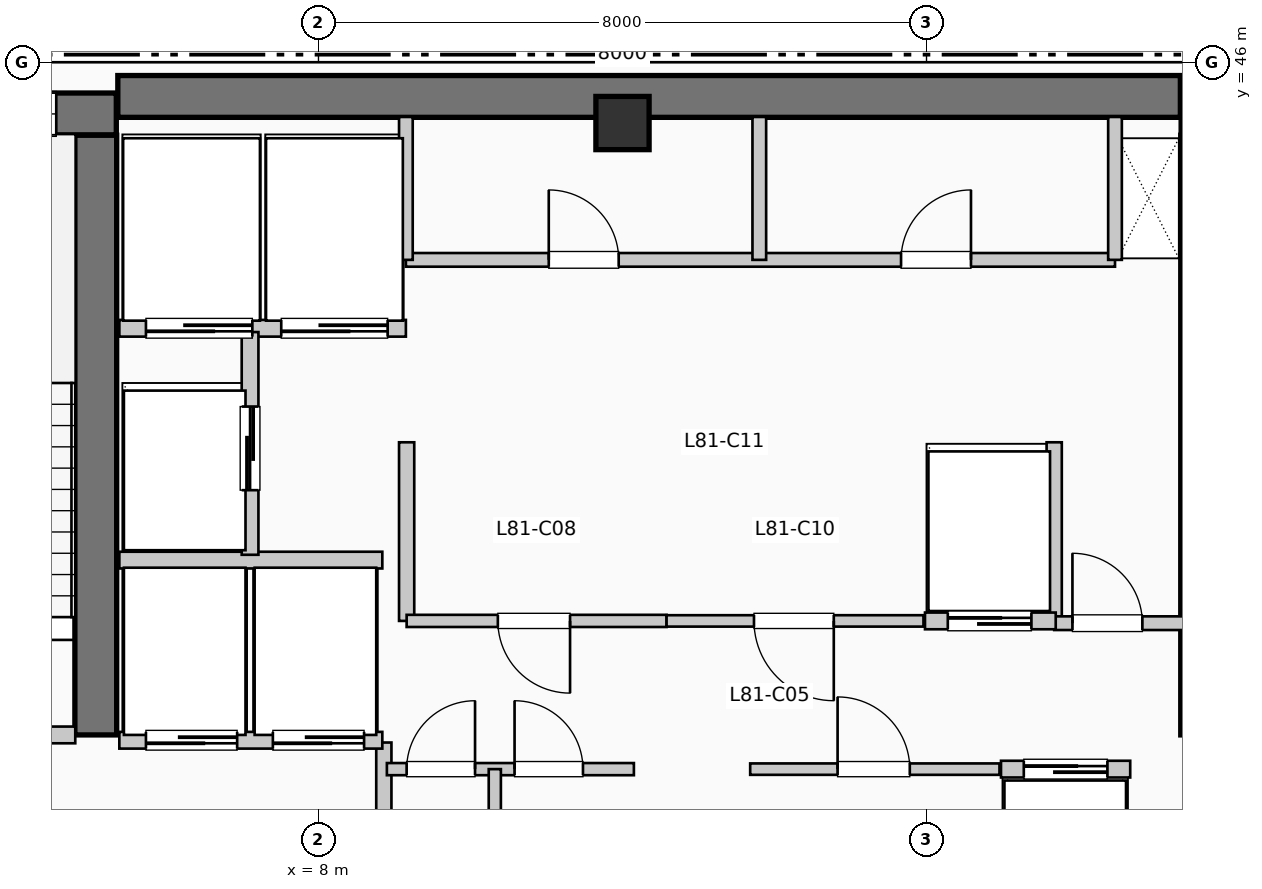
"""IFC4 building model, lengths in metres.
Left out: names, types, materials, properties, quantities, classifications, styles, units other than length and angle.
Written with IfcOpenShell. Run it as: python <this file> out.ifc"""

import sys

from ifc_helpers import new_model, si_unit, direction, frame, frame_2d, origin, origin_2d, place, context, subcontext, project, spatial, rectangle, extrude, element, fill, save


model = new_model("IFC4")
c1 = context("Model", 3, precision=1e-05, world=origin(), true_north=direction((0.0, 1.0)))
c2 = subcontext(c1, "Body", "Model", "MODEL_VIEW")
j1 = project(units=[si_unit("LENGTHUNIT", "METRE"), si_unit("PLANEANGLEUNIT", "RADIAN")], contexts=[c1])
p1 = place(None, origin())
s1 = spatial("IfcSite", under=j1, at=p1, CompositionType="ELEMENT")
p2 = place(p1, origin())
s2 = spatial("IfcBuilding", under=s1, at=p2, CompositionType="ELEMENT")
p3 = place(p2, frame((0.0, 0.0, 331.65)))
s3 = spatial("IfcBuildingStorey", under=s2, at=p3, CompositionType="ELEMENT", Elevation=331.65)
p4 = place(p3, frame((5.36, 45.55, 0.0), z_axis=(0.0, 0.0, 1.0), x_axis=(1.0, 0.0, 0.0)))
e1 = element("IfcWall", 1, at=p4, inside=s3, PredefinedType="SHEAR", context=c2, shape_type="SweptSolid", body=[
    extrude(rectangle(XDim=13.98, YDim=0.55, at=frame_2d((6.99, 0.0))), origin(), (0.0, 0.0, 1.0), 3.96),
])
p5 = place(p3, frame((5.07, 37.15, 0.0), z_axis=(0.0, 0.0, 1.0), x_axis=(0.0, 1.0, 0.0)))
e2 = element("IfcWall", 2, at=p5, inside=s3, PredefinedType="SHEAR", context=c2, shape_type="SweptSolid", body=[
    extrude(rectangle(XDim=7.89, YDim=0.55, at=frame_2d((3.945, 0.0))), origin(), (0.0, 0.0, 1.0), 3.96),
])
p6 = place(p3, frame((1.1, 45.32, 0.0), z_axis=(0.0, 0.0, 1.0), x_axis=(1.0, 0.0, 0.0)))
e3 = element("IfcWall", 3, at=p6, inside=s3, PredefinedType="SHEAR", context=c2, shape_type="SweptSolid", body=[
    extrude(rectangle(XDim=4.24, YDim=0.55, at=frame_2d((2.12, 0.0))), origin(), (0.0, 0.0, 1.0), 3.96),
])
p7 = place(p6, frame((2.05, 0.0, 1.05)))
e4 = element("IfcOpeningElement", 4, at=p7, cuts=e3, PredefinedType="OPENING", context=c2, shape_type="SweptSolid", body=[
    extrude(rectangle(XDim=1.4, YDim=1.8, at=frame_2d((0.7, 0.9))), frame((0.0, 0.285, 0.0), z_axis=(0.0, -1.0, 0.0), x_axis=(1.0, 0.0, 0.0)), (0.0, 0.0, 1.0), 0.57),
])
p8 = place(p3, frame((19.62, 37.15, 0.0), z_axis=(0.0, 0.0, 1.0), x_axis=(0.0, 1.0, 0.0)))
e5 = element("IfcWall", 5, at=p8, inside=s3, PredefinedType="SHEAR", context=c2, shape_type="SweptSolid", body=[
    extrude(rectangle(XDim=7.89, YDim=0.55, at=frame_2d((3.945, 0.0))), origin(), (0.0, 0.0, 1.0), 3.96),
])
p9 = place(p3, frame((19.35, 45.32, 0.0), z_axis=(0.0, 0.0, 1.0), x_axis=(1.0, 0.0, 0.0)))
e6 = element("IfcWall", 6, at=p9, inside=s3, PredefinedType="SHEAR", context=c2, shape_type="SweptSolid", body=[
    extrude(rectangle(XDim=3.69, YDim=0.55, at=frame_2d((1.845, 0.0))), origin(), (0.0, 0.0, 1.0), 3.96),
])
p10 = place(p9, frame((1.15, 0.0, 1.05)))
e7 = element("IfcOpeningElement", 7, at=p10, cuts=e6, PredefinedType="OPENING", context=c2, shape_type="SweptSolid", body=[
    extrude(rectangle(XDim=1.4, YDim=1.8, at=frame_2d((0.7, 0.9))), frame((0.0, 0.285, 0.0), z_axis=(0.0, -1.0, 0.0), x_axis=(1.0, 0.0, 0.0)), (0.0, 0.0, 1.0), 0.57),
])
p11 = place(p3, frame((12.0, 45.2, 0.0), z_axis=(0.0, 0.0, 1.0), x_axis=(1.0, 0.0, 0.0)))
e8 = element("IfcColumn", 8, at=p11, inside=s3, PredefinedType="COLUMN", context=c2, shape_type="SweptSolid", body=[
    extrude(rectangle(XDim=0.7, YDim=0.7, at=origin_2d()), origin(), (0.0, 0.0, 1.0), 3.96),
])
p12 = place(p3, frame((1.65, 37.15, 0.0), z_axis=(0.0, 0.0, 1.0), x_axis=(1.0, 0.0, 0.0)))
e9 = element("IfcWall", 9, at=p12, inside=s3, PredefinedType="PARTITIONING", context=c2, shape_type="SweptSolid", body=[
    extrude(rectangle(XDim=3.15, YDim=0.22, at=frame_2d((1.575, 0.0))), origin(), (0.0, 0.0, 1.0), 3.74),
])
p13 = place(p12, frame((2.05, 0.0, 0.0), z_axis=(0.0, 0.0, 1.0), x_axis=(-1.0, 0.0, 0.0)))
e10 = element("IfcOpeningElement", 10, at=p13, cuts=e9, PredefinedType="OPENING", context=c2, shape_type="SweptSolid", body=[
    extrude(rectangle(XDim=1.05, YDim=2.15, at=frame_2d((0.525, 1.075))), frame((0.0, 0.12, 0.0), z_axis=(0.0, -1.0, 0.0), x_axis=(1.0, 0.0, 0.0)), (0.0, 0.0, 1.0), 0.24),
])
p14 = place(p3, frame((8.86, 34.55, 0.0), z_axis=(0.0, 0.0, 1.0), x_axis=(0.0, 1.0, 0.0)))
e11 = element("IfcWall", 11, at=p14, inside=s3, PredefinedType="PARTITIONING", context=c2, shape_type="SweptSolid", body=[
    extrude(rectangle(XDim=2.5, YDim=0.2, at=frame_2d((1.25, 0.0))), origin(), (0.0, 0.0, 1.0), 3.74),
])
p15 = place(p3, frame((5.38, 37.08, 0.0), z_axis=(0.0, 0.0, 1.0), x_axis=(1.0, 0.0, 0.0)))
e12 = element("IfcWall", 12, at=p15, inside=s3, PredefinedType="PARTITIONING", context=c2, shape_type="SweptSolid", body=[
    extrude(rectangle(XDim=3.46, YDim=0.22, at=frame_2d((1.73, 0.0))), origin(), (0.0, 0.0, 1.0), 3.74),
])
p16 = place(p15, frame((1.55, 0.0, 0.0), z_axis=(0.0, 0.0, 1.0), x_axis=(-1.0, 0.0, 0.0)))
e13 = element("IfcOpeningElement", 13, at=p16, cuts=e12, PredefinedType="OPENING", context=c2, shape_type="SweptSolid", body=[
    extrude(rectangle(XDim=1.2, YDim=2.2, at=frame_2d((0.6, 1.1))), frame((0.0, 0.12, 0.0), z_axis=(0.0, -1.0, 0.0), x_axis=(1.0, 0.0, 0.0)), (0.0, 0.0, 1.0), 0.24),
])
p17 = place(p15, frame((3.22, 0.0, 0.0), z_axis=(0.0, 0.0, 1.0), x_axis=(-1.0, 0.0, 0.0)))
e14 = element("IfcOpeningElement", 14, at=p17, cuts=e12, PredefinedType="OPENING", context=c2, shape_type="SweptSolid", body=[
    extrude(rectangle(XDim=1.2, YDim=2.2, at=frame_2d((0.6, 1.1))), frame((0.0, 0.12, 0.0), z_axis=(0.0, -1.0, 0.0), x_axis=(1.0, 0.0, 0.0)), (0.0, 0.0, 1.0), 0.24),
])
p18 = place(p3, frame((5.38, 39.45, 0.0), z_axis=(0.0, 0.0, 1.0), x_axis=(1.0, 0.0, 0.0)))
e15 = element("IfcWall", 15, at=p18, inside=s3, PredefinedType="PARTITIONING", context=c2, shape_type="SweptSolid", body=[
    extrude(rectangle(XDim=3.46, YDim=0.22, at=frame_2d((1.73, 0.0))), origin(), (0.0, 0.0, 1.0), 3.74),
])
p19 = place(p3, frame((5.38, 42.5, 0.0), z_axis=(0.0, 0.0, 1.0), x_axis=(1.0, 0.0, 0.0)))
e16 = element("IfcWall", 16, at=p19, inside=s3, PredefinedType="PARTITIONING", context=c2, shape_type="SweptSolid", body=[
    extrude(rectangle(XDim=3.77, YDim=0.22, at=frame_2d((1.885, 0.0))), origin(), (0.0, 0.0, 1.0), 3.74),
])
p20 = place(p19, frame((1.75, 0.0, 0.0), z_axis=(0.0, 0.0, 1.0), x_axis=(-1.0, 0.0, 0.0)))
e17 = element("IfcOpeningElement", 17, at=p20, cuts=e16, PredefinedType="OPENING", context=c2, shape_type="SweptSolid", body=[
    extrude(rectangle(XDim=1.4, YDim=2.2, at=frame_2d((0.7, 1.1))), frame((0.0, 0.12, 0.0), z_axis=(0.0, -1.0, 0.0), x_axis=(1.0, 0.0, 0.0)), (0.0, 0.0, 1.0), 0.24),
])
p21 = place(p19, frame((3.53, 0.0, 0.0), z_axis=(0.0, 0.0, 1.0), x_axis=(-1.0, 0.0, 0.0)))
e18 = element("IfcOpeningElement", 18, at=p21, cuts=e16, PredefinedType="OPENING", context=c2, shape_type="SweptSolid", body=[
    extrude(rectangle(XDim=1.4, YDim=2.2, at=frame_2d((0.7, 1.1))), frame((0.0, 0.12, 0.0), z_axis=(0.0, -1.0, 0.0), x_axis=(1.0, 0.0, 0.0)), (0.0, 0.0, 1.0), 0.24),
])
p22 = place(p3, frame((7.1, 39.52, 0.0), z_axis=(0.0, 0.0, 1.0), x_axis=(0.0, 1.0, 0.0)))
e19 = element("IfcWall", 19, at=p22, inside=s3, PredefinedType="PARTITIONING", context=c2, shape_type="SweptSolid", body=[
    extrude(rectangle(XDim=2.93, YDim=0.22, at=frame_2d((1.465, 0.0))), origin(), (0.0, 0.0, 1.0), 3.74),
])
p23 = place(p22, frame((0.85, 0.0, 0.0)))
e20 = element("IfcOpeningElement", 20, at=p23, cuts=e19, PredefinedType="OPENING", context=c2, shape_type="SweptSolid", body=[
    extrude(rectangle(XDim=1.1, YDim=2.2, at=frame_2d((0.55, 1.1))), frame((0.0, 0.12, 0.0), z_axis=(0.0, -1.0, 0.0), x_axis=(1.0, 0.0, 0.0)), (0.0, 0.0, 1.0), 0.24),
])
for number, where, z_axis, x_axis in (
    (21, (9.16, 38.65, 0.0), (0.0, 0.0, 1.0), (0.0, 1.0, 0.0)),
    (22, (17.68, 38.65, 0.0), (0.0, 0.0, 1.0), (0.0, 1.0, 0.0)),
):
    element("IfcWall", number, at=place(p3, frame(where, z_axis=z_axis, x_axis=x_axis)), inside=s3, PredefinedType="PARTITIONING", context=c2, shape_type="SweptSolid", body=[
        extrude(rectangle(XDim=2.35, YDim=0.2, at=frame_2d((1.175, 0.0))), origin(), (0.0, 0.0, 1.0), 3.74),
    ])
p24 = place(p3, frame((17.68, 38.62, 0.0), z_axis=(0.0, 0.0, 1.0), x_axis=(1.0, 0.0, 0.0)))
e23 = element("IfcWall", 23, at=p24, inside=s3, PredefinedType="PARTITIONING", context=c2, shape_type="SweptSolid", body=[
    extrude(rectangle(XDim=1.84, YDim=0.18, at=frame_2d((0.92, 0.0))), origin(), (0.0, 0.0, 1.0), 3.74),
])
p25 = place(p24, frame((0.24, 0.0, 0.0)))
e24 = element("IfcOpeningElement", 24, at=p25, cuts=e23, PredefinedType="OPENING", context=c2, shape_type="SweptSolid", body=[
    extrude(rectangle(XDim=0.92, YDim=2.1, at=frame_2d((0.46, 1.05))), frame((0.0, 0.1, 0.0), z_axis=(0.0, -1.0, 0.0), x_axis=(1.0, 0.0, 0.0)), (0.0, 0.0, 1.0), 0.2),
])
p26 = place(p3, frame((8.9, 36.7, 0.0), z_axis=(0.0, 0.0, 1.0), x_axis=(1.0, 0.0, 0.0)))
e25 = element("IfcWall", 25, at=p26, inside=s3, PredefinedType="PARTITIONING", context=c2, shape_type="SweptSolid", body=[
    extrude(rectangle(XDim=3.25, YDim=0.16, at=frame_2d((1.625, 0.0))), origin(), (0.0, 0.0, 1.0), 3.74),
])
p27 = place(p26, frame((0.26, 0.0, 0.0)))
e26 = element("IfcOpeningElement", 26, at=p27, cuts=e25, PredefinedType="OPENING", context=c2, shape_type="SweptSolid", body=[
    extrude(rectangle(XDim=0.9, YDim=2.15, at=frame_2d((0.45, 1.075))), frame((0.0, 0.09, 0.0), z_axis=(0.0, -1.0, 0.0), x_axis=(1.0, 0.0, 0.0)), (0.0, 0.0, 1.0), 0.18),
])
p28 = place(p26, frame((1.68, 0.0, 0.0)))
e27 = element("IfcOpeningElement", 27, at=p28, cuts=e25, PredefinedType="OPENING", context=c2, shape_type="SweptSolid", body=[
    extrude(rectangle(XDim=0.9, YDim=2.15, at=frame_2d((0.45, 1.075))), frame((0.0, 0.09, 0.0), z_axis=(0.0, -1.0, 0.0), x_axis=(1.0, 0.0, 0.0)), (0.0, 0.0, 1.0), 0.18),
])
p29 = place(p3, frame((10.32, 34.55, 0.0), z_axis=(0.0, 0.0, 1.0), x_axis=(0.0, 1.0, 0.0)))
e28 = element("IfcWall", 28, at=p29, inside=s3, PredefinedType="PARTITIONING", context=c2, shape_type="SweptSolid", body=[
    extrude(rectangle(XDim=2.15, YDim=0.16, at=frame_2d((1.075, 0.0))), origin(), (0.0, 0.0, 1.0), 3.74),
])
p30 = place(p3, frame((9.16, 38.65, 0.0), z_axis=(0.0, 0.0, 1.0), x_axis=(1.0, 0.0, 0.0)))
e29 = element("IfcWall", 29, at=p30, inside=s3, PredefinedType="PARTITIONING", context=c2, shape_type="SweptSolid", body=[
    extrude(rectangle(XDim=3.42, YDim=0.16, at=frame_2d((1.71, 0.0))), origin(), (0.0, 0.0, 1.0), 3.74),
])
p31 = place(p30, frame((2.15, 0.0, 0.0), z_axis=(0.0, 0.0, 1.0), x_axis=(-1.0, 0.0, 0.0)))
e30 = element("IfcOpeningElement", 30, at=p31, cuts=e29, PredefinedType="OPENING", context=c2, shape_type="SweptSolid", body=[
    extrude(rectangle(XDim=0.95, YDim=2.15, at=frame_2d((0.475, 1.075))), frame((0.0, 0.09, 0.0), z_axis=(0.0, -1.0, 0.0), x_axis=(1.0, 0.0, 0.0)), (0.0, 0.0, 1.0), 0.18),
])
p32 = place(p3, frame((13.68, 36.7, 0.0), z_axis=(0.0, 0.0, 1.0), x_axis=(1.0, 0.0, 0.0)))
e31 = element("IfcWall", 31, at=p32, inside=s3, PredefinedType="PARTITIONING", context=c2, shape_type="SweptSolid", body=[
    extrude(rectangle(XDim=3.28, YDim=0.15, at=frame_2d((1.64, 0.0))), origin(), (0.0, 0.0, 1.0), 3.74),
])
p33 = place(p32, frame((1.15, 0.0, 0.0)))
e32 = element("IfcOpeningElement", 32, at=p33, cuts=e31, PredefinedType="OPENING", context=c2, shape_type="SweptSolid", body=[
    extrude(rectangle(XDim=0.95, YDim=2.15, at=frame_2d((0.475, 1.075))), frame((0.0, 0.085, 0.0), z_axis=(0.0, -1.0, 0.0), x_axis=(1.0, 0.0, 0.0)), (0.0, 0.0, 1.0), 0.17),
])
p34 = place(p3, frame((12.58, 38.65, 0.0), z_axis=(0.0, 0.0, 1.0), x_axis=(1.0, 0.0, 0.0)))
e33 = element("IfcWall", 33, at=p34, inside=s3, PredefinedType="PARTITIONING", context=c2, shape_type="SweptSolid", body=[
    extrude(rectangle(XDim=3.38, YDim=0.15, at=frame_2d((1.69, 0.0))), origin(), (0.0, 0.0, 1.0), 3.74),
])
p35 = place(p34, frame((2.2, 0.0, 0.0), z_axis=(0.0, 0.0, 1.0), x_axis=(-1.0, 0.0, 0.0)))
e34 = element("IfcOpeningElement", 34, at=p35, cuts=e33, PredefinedType="OPENING", context=c2, shape_type="SweptSolid", body=[
    extrude(rectangle(XDim=1.05, YDim=2.15, at=frame_2d((0.525, 1.075))), frame((0.0, 0.085, 0.0), z_axis=(0.0, -1.0, 0.0), x_axis=(1.0, 0.0, 0.0)), (0.0, 0.0, 1.0), 0.17),
])
p36 = place(p3, frame((16.98, 36.7, 0.0), z_axis=(0.0, 0.0, 1.0), x_axis=(1.0, 0.0, 0.0)))
e35 = element("IfcWall", 35, at=p36, inside=s3, PredefinedType="PARTITIONING", context=c2, shape_type="SweptSolid", body=[
    extrude(rectangle(XDim=1.7, YDim=0.22, at=frame_2d((0.85, 0.0))), origin(), (0.0, 0.0, 1.0), 3.74),
])
p37 = place(p36, frame((0.3, 0.0, 0.0)))
e36 = element("IfcOpeningElement", 36, at=p37, cuts=e35, PredefinedType="OPENING", context=c2, shape_type="SweptSolid", body=[
    extrude(rectangle(XDim=1.1, YDim=2.2, at=frame_2d((0.55, 1.1))), frame((0.0, 0.12, 0.0), z_axis=(0.0, -1.0, 0.0), x_axis=(1.0, 0.0, 0.0)), (0.0, 0.0, 1.0), 0.24),
])
p38 = place(p3, frame((15.98, 38.65, 0.0), z_axis=(0.0, 0.0, 1.0), x_axis=(1.0, 0.0, 0.0)))
e37 = element("IfcWall", 37, at=p38, inside=s3, PredefinedType="PARTITIONING", context=c2, shape_type="SweptSolid", body=[
    extrude(rectangle(XDim=1.72, YDim=0.22, at=frame_2d((0.86, 0.0))), origin(), (0.0, 0.0, 1.0), 3.74),
])
p39 = place(p38, frame((0.3, 0.0, 0.0)))
e38 = element("IfcOpeningElement", 38, at=p39, cuts=e37, PredefinedType="OPENING", context=c2, shape_type="SweptSolid", body=[
    extrude(rectangle(XDim=1.1, YDim=2.2, at=frame_2d((0.55, 1.1))), frame((0.0, 0.12, 0.0), z_axis=(0.0, -1.0, 0.0), x_axis=(1.0, 0.0, 0.0)), (0.0, 0.0, 1.0), 0.24),
])
p40 = place(p3, frame((9.15, 43.4, 0.0), z_axis=(0.0, 0.0, 1.0), x_axis=(1.0, 0.0, 0.0)))
e39 = element("IfcWall", 39, at=p40, inside=s3, PredefinedType="PLUMBINGWALL", context=c2, shape_type="SweptSolid", body=[
    extrude(rectangle(XDim=9.33, YDim=0.18, at=frame_2d((4.665, 0.0))), origin(), (0.0, 0.0, 1.0), 3.74),
])
p41 = place(p40, frame((1.88, 0.0, 0.0)))
e40 = element("IfcOpeningElement", 40, at=p41, cuts=e39, PredefinedType="OPENING", context=c2, shape_type="SweptSolid", body=[
    extrude(rectangle(XDim=0.92, YDim=2.1, at=frame_2d((0.46, 1.05))), frame((0.0, 0.1, 0.0), z_axis=(0.0, -1.0, 0.0), x_axis=(1.0, 0.0, 0.0)), (0.0, 0.0, 1.0), 0.2),
])
p42 = place(p40, frame((6.515, 0.0, 0.0)))
e41 = element("IfcOpeningElement", 41, at=p42, cuts=e39, PredefinedType="OPENING", context=c2, shape_type="SweptSolid", body=[
    extrude(rectangle(XDim=0.92, YDim=2.1, at=frame_2d((0.46, 1.05))), frame((0.0, 0.1, 0.0), z_axis=(0.0, -1.0, 0.0), x_axis=(1.0, 0.0, 0.0)), (0.0, 0.0, 1.0), 0.2),
])
for number, where, z_axis, x_axis in (
    (42, (9.15, 43.4, 0.0), (0.0, 0.0, 1.0), (0.0, 1.0, 0.0)),
    (43, (18.48, 43.4, 0.0), (0.0, 0.0, 1.0), (0.0, 1.0, 0.0)),
    (44, (13.8, 43.4, 0.0), (0.0, 0.0, 1.0), (0.0, 1.0, 0.0)),
):
    element("IfcWall", number, at=place(p3, frame(where, z_axis=z_axis, x_axis=x_axis)), inside=s3, PredefinedType="PLUMBINGWALL", context=c2, shape_type="SweptSolid", body=[
        extrude(rectangle(XDim=1.88, YDim=0.18, at=frame_2d((0.94, 0.0))), origin(), (0.0, 0.0, 1.0), 3.74),
    ])
p43 = place(p7, origin())
e45 = element("IfcWindow", 45, at=p43, inside=s3, PartitioningType="SINGLE_PANEL", PredefinedType="WINDOW", context=c2, shape_type="SweptSolid", body=[
    extrude(rectangle(XDim=1.4, YDim=1.8, at=frame_2d((0.7, 0.9))), frame((0.0, 0.03, 0.0), z_axis=(0.0, -1.0, 0.0), x_axis=(1.0, 0.0, 0.0)), (0.0, 0.0, 1.0), 0.06),
])
fill(e4, e45)
p44 = place(p16, origin())
e46 = element("IfcDoor", 46, at=p44, inside=s3, OperationType="SLIDING_TO_RIGHT", PredefinedType="DOOR", context=c2, shape_type="SweptSolid", body=[
    extrude(rectangle(XDim=1.2, YDim=2.2, at=frame_2d((0.6, 1.1))), frame((0.0, 0.025, 0.0), z_axis=(0.0, -1.0, 0.0), x_axis=(1.0, 0.0, 0.0)), (0.0, 0.0, 1.0), 0.05),
])
fill(e13, e46)
p45 = place(p17, origin())
e47 = element("IfcDoor", 47, at=p45, inside=s3, OperationType="SLIDING_TO_RIGHT", PredefinedType="DOOR", context=c2, shape_type="SweptSolid", body=[
    extrude(rectangle(XDim=1.2, YDim=2.2, at=frame_2d((0.6, 1.1))), frame((0.0, 0.025, 0.0), z_axis=(0.0, -1.0, 0.0), x_axis=(1.0, 0.0, 0.0)), (0.0, 0.0, 1.0), 0.05),
])
fill(e14, e47)
p46 = place(p20, origin())
e48 = element("IfcDoor", 48, at=p46, inside=s3, OperationType="SLIDING_TO_LEFT", PredefinedType="DOOR", context=c2, shape_type="SweptSolid", body=[
    extrude(rectangle(XDim=1.4, YDim=2.2, at=frame_2d((0.7, 1.1))), frame((0.0, 0.025, 0.0), z_axis=(0.0, -1.0, 0.0), x_axis=(1.0, 0.0, 0.0)), (0.0, 0.0, 1.0), 0.05),
])
fill(e17, e48)
p47 = place(p21, origin())
e49 = element("IfcDoor", 49, at=p47, inside=s3, OperationType="SLIDING_TO_LEFT", PredefinedType="DOOR", context=c2, shape_type="SweptSolid", body=[
    extrude(rectangle(XDim=1.4, YDim=2.2, at=frame_2d((0.7, 1.1))), frame((0.0, 0.025, 0.0), z_axis=(0.0, -1.0, 0.0), x_axis=(1.0, 0.0, 0.0)), (0.0, 0.0, 1.0), 0.05),
])
fill(e18, e49)
p48 = place(p23, origin())
e50 = element("IfcDoor", 50, at=p48, inside=s3, OperationType="SLIDING_TO_LEFT", PredefinedType="DOOR", context=c2, shape_type="SweptSolid", body=[
    extrude(rectangle(XDim=1.1, YDim=2.2, at=frame_2d((0.55, 1.1))), frame((0.0, 0.025, 0.0), z_axis=(0.0, -1.0, 0.0), x_axis=(1.0, 0.0, 0.0)), (0.0, 0.0, 1.0), 0.05),
])
fill(e20, e50)
p49 = place(p25, origin())
e51 = element("IfcDoor", 51, at=p49, inside=s3, OperationType="SINGLE_SWING_LEFT", PredefinedType="DOOR", context=c2, shape_type="SweptSolid", body=[
    extrude(rectangle(XDim=0.92, YDim=2.1, at=frame_2d((0.46, 1.05))), frame((0.0, 0.025, 0.0), z_axis=(0.0, -1.0, 0.0), x_axis=(1.0, 0.0, 0.0)), (0.0, 0.0, 1.0), 0.05),
])
fill(e24, e51)
p50 = place(p27, origin())
e52 = element("IfcDoor", 52, at=p50, inside=s3, OperationType="SINGLE_SWING_RIGHT", PredefinedType="DOOR", context=c2, shape_type="SweptSolid", body=[
    extrude(rectangle(XDim=0.9, YDim=2.15, at=frame_2d((0.45, 1.075))), frame((0.0, 0.025, 0.0), z_axis=(0.0, -1.0, 0.0), x_axis=(1.0, 0.0, 0.0)), (0.0, 0.0, 1.0), 0.05),
])
fill(e26, e52)
p51 = place(p28, origin())
e53 = element("IfcDoor", 53, at=p51, inside=s3, OperationType="SINGLE_SWING_LEFT", PredefinedType="DOOR", context=c2, shape_type="SweptSolid", body=[
    extrude(rectangle(XDim=0.9, YDim=2.15, at=frame_2d((0.45, 1.075))), frame((0.0, 0.025, 0.0), z_axis=(0.0, -1.0, 0.0), x_axis=(1.0, 0.0, 0.0)), (0.0, 0.0, 1.0), 0.05),
])
fill(e27, e53)
p52 = place(p31, origin())
e54 = element("IfcDoor", 54, at=p52, inside=s3, OperationType="SINGLE_SWING_RIGHT", PredefinedType="DOOR", context=c2, shape_type="SweptSolid", body=[
    extrude(rectangle(XDim=0.95, YDim=2.15, at=frame_2d((0.475, 1.075))), frame((0.0, 0.025, 0.0), z_axis=(0.0, -1.0, 0.0), x_axis=(1.0, 0.0, 0.0)), (0.0, 0.0, 1.0), 0.05),
])
fill(e30, e54)
p53 = place(p33, origin())
e55 = element("IfcDoor", 55, at=p53, inside=s3, OperationType="SINGLE_SWING_LEFT", PredefinedType="DOOR", context=c2, shape_type="SweptSolid", body=[
    extrude(rectangle(XDim=0.95, YDim=2.15, at=frame_2d((0.475, 1.075))), frame((0.0, 0.025, 0.0), z_axis=(0.0, -1.0, 0.0), x_axis=(1.0, 0.0, 0.0)), (0.0, 0.0, 1.0), 0.05),
])
fill(e32, e55)
p54 = place(p35, origin())
e56 = element("IfcDoor", 56, at=p54, inside=s3, OperationType="SINGLE_SWING_RIGHT", PredefinedType="DOOR", context=c2, shape_type="SweptSolid", body=[
    extrude(rectangle(XDim=1.05, YDim=2.15, at=frame_2d((0.525, 1.075))), frame((0.0, 0.025, 0.0), z_axis=(0.0, -1.0, 0.0), x_axis=(1.0, 0.0, 0.0)), (0.0, 0.0, 1.0), 0.05),
])
fill(e34, e56)
p55 = place(p37, origin())
e57 = element("IfcDoor", 57, at=p55, inside=s3, OperationType="SLIDING_TO_LEFT", PredefinedType="DOOR", context=c2, shape_type="SweptSolid", body=[
    extrude(rectangle(XDim=1.1, YDim=2.2, at=frame_2d((0.55, 1.1))), frame((0.0, 0.025, 0.0), z_axis=(0.0, -1.0, 0.0), x_axis=(1.0, 0.0, 0.0)), (0.0, 0.0, 1.0), 0.05),
])
fill(e36, e57)
p56 = place(p39, origin())
e58 = element("IfcDoor", 58, at=p56, inside=s3, OperationType="SLIDING_TO_LEFT", PredefinedType="DOOR", context=c2, shape_type="SweptSolid", body=[
    extrude(rectangle(XDim=1.1, YDim=2.2, at=frame_2d((0.55, 1.1))), frame((0.0, 0.025, 0.0), z_axis=(0.0, -1.0, 0.0), x_axis=(1.0, 0.0, 0.0)), (0.0, 0.0, 1.0), 0.05),
])
fill(e38, e58)
p57 = place(p41, origin())
e59 = element("IfcDoor", 59, at=p57, inside=s3, OperationType="SINGLE_SWING_LEFT", PredefinedType="DOOR", context=c2, shape_type="SweptSolid", body=[
    extrude(rectangle(XDim=0.92, YDim=2.1, at=frame_2d((0.46, 1.05))), frame((0.0, 0.025, 0.0), z_axis=(0.0, -1.0, 0.0), x_axis=(1.0, 0.0, 0.0)), (0.0, 0.0, 1.0), 0.05),
])
fill(e40, e59)
p58 = place(p42, origin())
e60 = element("IfcDoor", 60, at=p58, inside=s3, OperationType="SINGLE_SWING_RIGHT", PredefinedType="DOOR", context=c2, shape_type="SweptSolid", body=[
    extrude(rectangle(XDim=0.92, YDim=2.1, at=frame_2d((0.46, 1.05))), frame((0.0, 0.025, 0.0), z_axis=(0.0, -1.0, 0.0), x_axis=(1.0, 0.0, 0.0)), (0.0, 0.0, 1.0), 0.05),
])
fill(e41, e60)
save(model, sys.argv[1])
